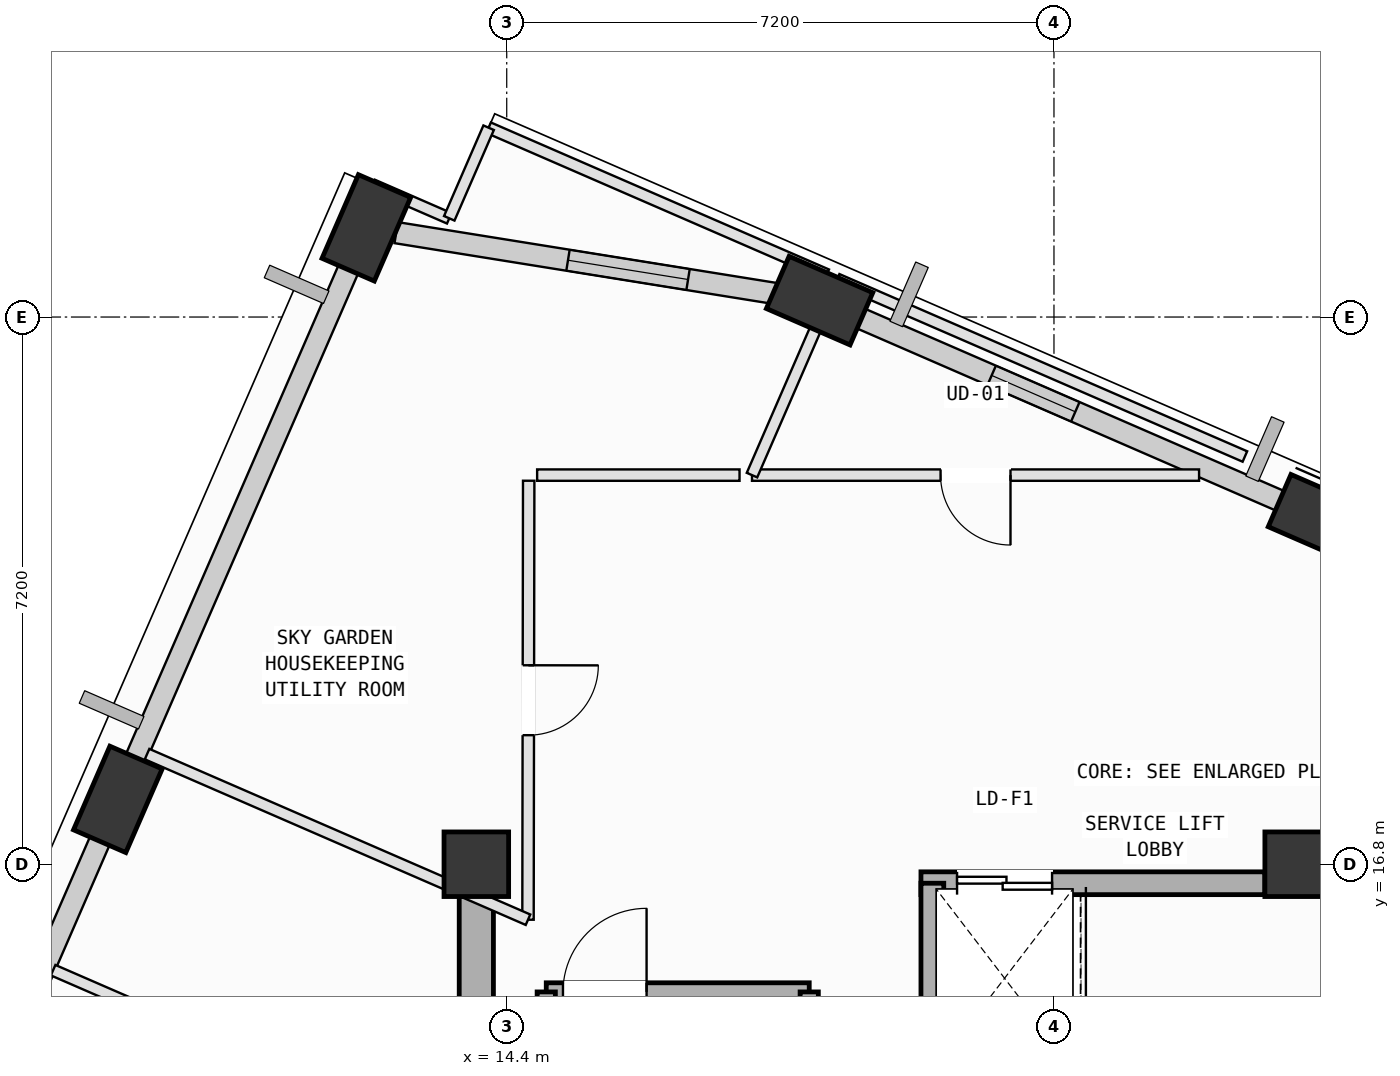
"""IFC4 building model, lengths in metres.
Left out: names, types, materials, properties, quantities, classifications, styles, units other than length and angle.
Written with IfcOpenShell. Run it as: python <this file> out.ifc"""

import sys

from ifc_helpers import new_model, si_unit, direction, frame, frame_2d, origin, origin_2d, place, context, subcontext, project, spatial, rectangle, extrude, element, fill, save


model = new_model("IFC4")
c1 = context("Model", 3, precision=1e-05, world=origin(), true_north=direction((0.0, 1.0)))
c2 = subcontext(c1, "Body", "Model", "MODEL_VIEW")
j1 = project(units=[si_unit("LENGTHUNIT", "METRE"), si_unit("PLANEANGLEUNIT", "RADIAN")], contexts=[c1])
p1 = place(None, origin())
s1 = spatial("IfcSite", under=j1, at=p1, CompositionType="ELEMENT")
p2 = place(p1, origin())
s2 = spatial("IfcBuilding", under=s1, at=p2, CompositionType="ELEMENT")
p3 = place(p2, frame((0.0, 0.0, 328.6)))
s3 = spatial("IfcBuildingStorey", under=s2, at=p3, CompositionType="ELEMENT", Elevation=328.6)
for number, where, z_axis, x_axis in (
    (1, (14.0, 16.8, 0.0), (0.0, 0.0, 1.0), (1.0, 0.0, 0.0)),
    (2, (24.8, 16.8, 0.0), (0.0, 0.0, 1.0), (1.0, 0.0, 0.0)),
):
    element("IfcColumn", number, at=place(p3, frame(where, z_axis=z_axis, x_axis=x_axis)), inside=s3, PredefinedType="COLUMN", context=c2, shape_type="SweptSolid", body=[
        extrude(rectangle(XDim=0.85, YDim=0.85, at=origin_2d()), origin(), (0.0, 0.0, 1.0), 4.8),
    ])
for number, where, z_axis, x_axis in (
    (3, (25.119, 21.345, 0.002), (0.0, 0.0, 1.0), (-0.917, 0.399, 0.0)),
    (4, (18.516, 24.216, 0.002), (0.0, 0.0, 1.0), (-0.917, 0.399, 0.0)),
    (5, (12.553, 25.173, 0.002), (0.0, 0.0, 1.0), (0.399, 0.917, 0.0)),
    (6, (9.283, 17.654, 0.002), (0.0, 0.0, 1.0), (0.399, 0.917, 0.0)),
):
    element("IfcColumn", number, at=place(p3, frame(where, z_axis=z_axis, x_axis=x_axis)), inside=s3, PredefinedType="COLUMN", context=c2, shape_type="SweptSolid", body=[
        extrude(rectangle(XDim=1.2, YDim=0.75, at=origin_2d()), origin(), (0.0, 0.0, 1.0), 4.796),
    ])
p4 = place(p3, frame((18.881, 24.058, 0.0), z_axis=(0.0, 0.0, 1.0), x_axis=(0.917070056253, -0.398726111414, 0.0)))
e7 = element("IfcWall", 7, at=p4, inside=s3, PredefinedType="SOLIDWALL", context=c2, shape_type="SweptSolid", body=[
    extrude(rectangle(XDim=6.405, YDim=0.28, at=frame_2d((3.202, 0.0))), origin(), (0.0, 0.0, 1.0), 4.065),
])
p5 = place(p4, frame((2.071, 0.0, 0.75)))
e8 = element("IfcOpeningElement", 8, at=p5, cuts=e7, PredefinedType="OPENING", context=c2, shape_type="SweptSolid", body=[
    extrude(rectangle(XDim=1.2, YDim=1.75, at=frame_2d((0.6, 0.875))), frame((0.0, 0.15, 0.0), z_axis=(0.0, -1.0, 0.0), x_axis=(1.0, 0.0, 0.0)), (0.0, 0.0, 1.0), 0.3),
])
p6 = place(p3, frame((12.946, 25.11, 0.0), z_axis=(0.0, 0.0, 1.0), x_axis=(0.987363821305, -0.158469821666, 0.0)))
e9 = element("IfcWall", 9, at=p6, inside=s3, PredefinedType="SOLIDWALL", context=c2, shape_type="SweptSolid", body=[
    extrude(rectangle(XDim=5.244, YDim=0.28, at=frame_2d((2.622, 0.0))), origin(), (0.0, 0.0, 1.0), 4.065),
])
p7 = place(p6, frame((2.289, 0.0, 0.75)))
e10 = element("IfcOpeningElement", 10, at=p7, cuts=e9, PredefinedType="OPENING", context=c2, shape_type="SweptSolid", body=[
    extrude(rectangle(XDim=1.6, YDim=1.95, at=frame_2d((0.8, 0.975))), frame((0.0, 0.15, 0.0), z_axis=(0.0, -1.0, 0.0), x_axis=(1.0, 0.0, 0.0)), (0.0, 0.0, 1.0), 0.3),
])
p8 = place(p3, frame((9.442, 18.018, 0.0), z_axis=(0.0, 0.0, 1.0), x_axis=(0.398768305896, 0.917051709672, 0.0)))
e11 = element("IfcWall", 11, at=p8, inside=s3, PredefinedType="SOLIDWALL", context=c2, shape_type="SweptSolid", body=[
    extrude(rectangle(XDim=7.405, YDim=0.28, at=frame_2d((3.703, 0.0))), origin(), (0.0, 0.0, 1.0), 4.065),
])
p9 = place(p3, frame((6.172, 10.498, 0.0), z_axis=(0.0, 0.0, 1.0), x_axis=(0.398740578379, 0.917063766133, 0.0)))
e12 = element("IfcWall", 12, at=p9, inside=s3, PredefinedType="SOLIDWALL", context=c2, shape_type="SweptSolid", body=[
    extrude(rectangle(XDim=7.405, YDim=0.28, at=frame_2d((3.702, 0.0))), origin(), (0.0, 0.0, 1.0), 4.065),
])
p10 = place(p3, frame((14.92, 15.12, 0.0), z_axis=(0.0, 0.0, 1.0), x_axis=(1.0, 0.0, 0.0)))
e13 = element("IfcWall", 13, at=p10, inside=s3, PredefinedType="SOLIDWALL", context=c2, shape_type="SweptSolid", body=[
    extrude(rectangle(XDim=3.46, YDim=0.24, at=frame_2d((1.73, 0.0))), origin(), (0.0, 0.0, 1.0), 4.58),
])
p11 = place(p10, frame((0.22, 0.0, 0.0)))
e14 = element("IfcOpeningElement", 14, at=p11, cuts=e13, PredefinedType="OPENING", context=c2, shape_type="SweptSolid", body=[
    extrude(rectangle(XDim=1.1, YDim=2.15, at=frame_2d((0.55, 1.075))), frame((0.0, 0.13, 0.0), z_axis=(0.0, -1.0, 0.0), x_axis=(1.0, 0.0, 0.0)), (0.0, 0.0, 1.0), 0.26),
])
for number, where, z_axis, x_axis in (
    (15, (18.38, 15.12, 0.0), (0.0, 0.0, 1.0), (0.0, -1.0, 0.0)),
    (16, (14.92, 8.025, 0.0), (0.0, 0.0, 1.0), (0.0, 1.0, 0.0)),
):
    element("IfcWall", number, at=place(p3, frame(where, z_axis=z_axis, x_axis=x_axis)), inside=s3, PredefinedType="SOLIDWALL", context=c2, shape_type="SweptSolid", body=[
        extrude(rectangle(XDim=7.095, YDim=0.24, at=frame_2d((3.548, 0.0))), origin(), (0.0, 0.0, 1.0), 4.58),
    ])
p12 = place(p3, frame((14.0, 16.8, 0.0), z_axis=(0.0, 0.0, 1.0), x_axis=(0.0, -1.0, 0.0)))
e17 = element("IfcWall", 17, at=p12, inside=s3, PredefinedType="SHEAR", context=c2, shape_type="SweptSolid", body=[
    extrude(rectangle(XDim=9.0, YDim=0.45, at=frame_2d((4.5, 0.0))), origin(), (0.0, 0.0, 1.0), 4.58),
])
p13 = place(p3, frame((19.85, 16.55, 0.0), z_axis=(0.0, 0.0, 1.0), x_axis=(1.0, 0.0, 0.0)))
e18 = element("IfcWall", 18, at=p13, inside=s3, PredefinedType="SOLIDWALL", context=c2, shape_type="SweptSolid", body=[
    extrude(rectangle(XDim=4.525, YDim=0.3, at=frame_2d((2.262, 0.0))), origin(), (0.0, 0.0, 1.0), 4.58),
])
p14 = place(p13, frame((0.475, 0.0, 0.0)))
e19 = element("IfcOpeningElement", 19, at=p14, cuts=e18, PredefinedType="OPENING", context=c2, shape_type="SweptSolid", body=[
    extrude(rectangle(XDim=1.25, YDim=2.18, at=frame_2d((0.625, 1.09))), frame((0.0, 0.16, 0.0), z_axis=(0.0, -1.0, 0.0), x_axis=(1.0, 0.0, 0.0)), (0.0, 0.0, 1.0), 0.32),
])
p15 = place(p3, frame((20.0, 13.82, 0.0), z_axis=(0.0, 0.0, 1.0), x_axis=(0.0, 1.0, 0.0)))
e20 = element("IfcWall", 20, at=p15, inside=s3, PredefinedType="SOLIDWALL", context=c2, shape_type="SweptSolid", body=[
    extrude(rectangle(XDim=2.73, YDim=0.3, at=frame_2d((1.365, 0.0))), origin(), (0.0, 0.0, 1.0), 4.58),
])
p16 = place(p3, frame((8.432, 15.406, 0.0), z_axis=(0.0, 0.0, 1.0), x_axis=(0.917075309006, -0.398714029865, 0.0)))
e21 = element("IfcWall", 21, at=p16, inside=s3, PredefinedType="PARTITIONING", context=c2, shape_type="SweptSolid", body=[
    extrude(rectangle(XDim=5.911, YDim=0.15, at=frame_2d((2.956, 0.0))), origin(), (0.0, 0.0, 1.0), 4.58),
])
p17 = place(p3, frame((18.747, 24.497, 0.0), z_axis=(0.0, 0.0, 1.0), x_axis=(0.91710588147, -0.39864370329, 0.0)))
e22 = element("IfcWall", 22, at=p17, inside=s3, PredefinedType="PARTITIONING", context=c2, shape_type="SweptSolid", body=[
    extrude(rectangle(XDim=5.85, YDim=0.15, at=frame_2d((2.925, 0.0))), origin(), (0.0, 0.0, 1.0), 4.065),
])
p18 = place(p3, frame((23.509, 21.92, 0.0), z_axis=(0.0, 0.0, 1.0), x_axis=(-1.0, 0.0, 0.0)))
e23 = element("IfcWall", 23, at=p18, inside=s3, PredefinedType="PARTITIONING", context=c2, shape_type="SweptSolid", body=[
    extrude(rectangle(XDim=5.882, YDim=0.15, at=frame_2d((2.941, 0.0))), origin(), (0.0, 0.0, 1.0), 4.58),
])
p19 = place(p18, frame((2.481, 0.0, 0.0)))
e24 = element("IfcOpeningElement", 24, at=p19, cuts=e23, PredefinedType="OPENING", context=c2, shape_type="SweptSolid", body=[
    extrude(rectangle(XDim=0.92, YDim=2.1, at=frame_2d((0.46, 1.05))), frame((0.0, 0.085, 0.0), z_axis=(0.0, -1.0, 0.0), x_axis=(1.0, 0.0, 0.0)), (0.0, 0.0, 1.0), 0.17),
])
p20 = place(p3, frame((17.627, 21.92, 0.0), z_axis=(0.0, 0.0, 1.0), x_axis=(0.398611739829, 0.91711977455, 0.0)))
e25 = element("IfcWall", 25, at=p20, inside=s3, PredefinedType="PARTITIONING", context=c2, shape_type="SweptSolid", body=[
    extrude(rectangle(XDim=2.81, YDim=0.15, at=frame_2d((1.405, 0.0))), origin(), (0.0, 0.0, 1.0), 3.565),
])
p21 = place(p3, frame((14.162, 26.491, 0.0), z_axis=(0.0, 0.0, 1.0), x_axis=(0.917057251911, -0.39875556011, 0.0)))
e26 = element("IfcWall", 26, at=p21, inside=s3, PredefinedType="PARTITIONING", context=c2, shape_type="SweptSolid", body=[
    extrude(rectangle(XDim=4.85, YDim=0.15, at=frame_2d((2.425, 0.0))), origin(), (0.0, 0.0, 1.0), 4.065),
])
p22 = place(p3, frame((17.463, 21.92, 0.0), z_axis=(0.0, 0.0, 1.0), x_axis=(-1.0, 0.0, 0.0)))
e27 = element("IfcWall", 27, at=p22, inside=s3, PredefinedType="PARTITIONING", context=c2, shape_type="SweptSolid", body=[
    extrude(rectangle(XDim=2.663, YDim=0.15, at=frame_2d((1.332, 0.0))), origin(), (0.0, 0.0, 1.0), 4.58),
])
p23 = place(p3, frame((14.689, 21.846, 0.0), z_axis=(0.0, 0.0, 1.0), x_axis=(-0.001563951084, -0.999998777028, 0.0)))
e28 = element("IfcWall", 28, at=p23, inside=s3, PredefinedType="PARTITIONING", context=c2, shape_type="SweptSolid", body=[
    extrude(rectangle(XDim=5.776, YDim=0.15, at=frame_2d((2.888, 0.0))), origin(), (0.0, 0.0, 1.0), 4.58),
])
p24 = place(p23, frame((2.428, 0.0, 0.0)))
e29 = element("IfcOpeningElement", 29, at=p24, cuts=e28, PredefinedType="OPENING", context=c2, shape_type="SweptSolid", body=[
    extrude(rectangle(XDim=0.92, YDim=2.1, at=frame_2d((0.46, 1.05))), frame((0.0, 0.085, 0.0), z_axis=(0.0, -1.0, 0.0), x_axis=(1.0, 0.0, 0.0)), (0.0, 0.0, 1.0), 0.17),
])
p25 = place(p3, frame((14.68, 16.07, 0.0), z_axis=(0.0, 0.0, 1.0), x_axis=(-0.917080709133, 0.398701608895, 0.0)))
e30 = element("IfcWall", 30, at=p25, inside=s3, PredefinedType="PARTITIONING", context=c2, shape_type="SweptSolid", body=[
    extrude(rectangle(XDim=5.465, YDim=0.15, at=frame_2d((2.732, 0.0))), origin(), (0.0, 0.0, 1.0), 3.565),
])
p26 = place(p3, frame((12.257, 24.869, 0.0), z_axis=(0.0, 0.0, 1.0), x_axis=(0.398763788566, 0.917053673963, 0.0)))
e31 = element("IfcWall", 31, at=p26, inside=s3, PredefinedType="PARTITIONING", context=c2, shape_type="SweptSolid", body=[
    extrude(rectangle(XDim=0.948, YDim=0.15, at=frame_2d((0.474, 0.0))), origin(), (0.0, 0.0, 1.0), 4.065),
])
p27 = place(p3, frame((12.635, 25.738, 0.0), z_axis=(0.0, 0.0, 1.0), x_axis=(0.916985379611, -0.398920811164, 0.0)))
e32 = element("IfcWall", 32, at=p27, inside=s3, PredefinedType="PARTITIONING", context=c2, shape_type="SweptSolid", body=[
    extrude(rectangle(XDim=1.1, YDim=0.15, at=frame_2d((0.55, 0.0))), origin(), (0.0, 0.0, 1.0), 4.065),
])
p28 = place(p3, frame((13.644, 25.299, 0.0), z_axis=(0.0, 0.0, 1.0), x_axis=(0.398629941404, 0.917111863306, 0.0)))
e33 = element("IfcWall", 33, at=p28, inside=s3, PredefinedType="PARTITIONING", context=c2, shape_type="SweptSolid", body=[
    extrude(rectangle(XDim=1.3, YDim=0.15, at=frame_2d((0.65, 0.0))), origin(), (0.0, 0.0, 1.0), 4.58),
])
p29 = place(p5, origin())
e34 = element("IfcWindow", 34, at=p29, inside=s3, PartitioningType="SINGLE_PANEL", PredefinedType="WINDOW", context=c2, shape_type="SweptSolid", body=[
    extrude(rectangle(XDim=1.2, YDim=1.75, at=frame_2d((0.6, 0.875))), frame((0.0, 0.03, 0.0), z_axis=(0.0, -1.0, 0.0), x_axis=(1.0, 0.0, 0.0)), (0.0, 0.0, 1.0), 0.06),
])
fill(e8, e34)
p30 = place(p7, origin())
e35 = element("IfcWindow", 35, at=p30, inside=s3, PartitioningType="SINGLE_PANEL", PredefinedType="WINDOW", context=c2, shape_type="SweptSolid", body=[
    extrude(rectangle(XDim=1.6, YDim=1.95, at=frame_2d((0.8, 0.975))), frame((0.0, 0.03, 0.0), z_axis=(0.0, -1.0, 0.0), x_axis=(1.0, 0.0, 0.0)), (0.0, 0.0, 1.0), 0.06),
])
fill(e10, e35)
p31 = place(p11, origin())
e36 = element("IfcDoor", 36, at=p31, inside=s3, OperationType="SINGLE_SWING_RIGHT", PredefinedType="DOOR", context=c2, shape_type="SweptSolid", body=[
    extrude(rectangle(XDim=1.1, YDim=2.15, at=frame_2d((0.55, 1.075))), frame((0.0, 0.025, 0.0), z_axis=(0.0, -1.0, 0.0), x_axis=(1.0, 0.0, 0.0)), (0.0, 0.0, 1.0), 0.05),
])
fill(e14, e36)
p32 = place(p14, origin())
e37 = element("IfcDoor", 37, at=p32, inside=s3, OperationType="DOUBLE_DOOR_SLIDING", PredefinedType="DOOR", context=c2, shape_type="SweptSolid", body=[
    extrude(rectangle(XDim=1.25, YDim=2.18, at=frame_2d((0.625, 1.09))), frame((0.0, 0.025, 0.0), z_axis=(0.0, -1.0, 0.0), x_axis=(1.0, 0.0, 0.0)), (0.0, 0.0, 1.0), 0.05),
])
fill(e19, e37)
p33 = place(p19, origin())
e38 = element("IfcDoor", 38, at=p33, inside=s3, OperationType="SINGLE_SWING_LEFT", PredefinedType="DOOR", context=c2, shape_type="SweptSolid", body=[
    extrude(rectangle(XDim=0.92, YDim=2.1, at=frame_2d((0.46, 1.05))), frame((0.0, 0.025, 0.0), z_axis=(0.0, -1.0, 0.0), x_axis=(1.0, 0.0, 0.0)), (0.0, 0.0, 1.0), 0.05),
])
fill(e24, e38)
p34 = place(p24, origin())
e39 = element("IfcDoor", 39, at=p34, inside=s3, OperationType="SINGLE_SWING_LEFT", PredefinedType="DOOR", context=c2, shape_type="SweptSolid", body=[
    extrude(rectangle(XDim=0.92, YDim=2.1, at=frame_2d((0.46, 1.05))), frame((0.0, 0.025, 0.0), z_axis=(0.0, -1.0, 0.0), x_axis=(1.0, 0.0, 0.0)), (0.0, 0.0, 1.0), 0.05),
])
fill(e29, e39)
save(model, sys.argv[1])
